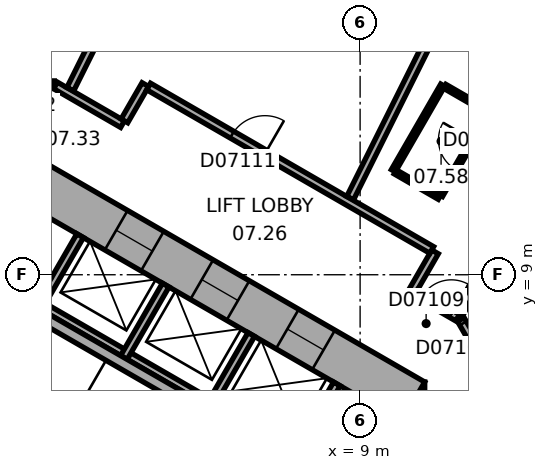
"""IFC4 building model, lengths in metres.
Left out: names, types, materials, properties, quantities, classifications, styles, units other than length and angle.
Written with IfcOpenShell. Run it as: python <this file> out.ifc"""

import sys

from ifc_helpers import new_model, si_unit, direction, frame, frame_2d, origin, place, context, subcontext, project, spatial, rectangle, extrude, element, fill, save


model = new_model("IFC4")
c1 = context("Model", 3, precision=1e-05, world=origin(), true_north=direction((0.0, 1.0)))
c2 = subcontext(c1, "Body", "Model", "MODEL_VIEW")
j1 = project(units=[si_unit("LENGTHUNIT", "METRE"), si_unit("PLANEANGLEUNIT", "RADIAN")], contexts=[c1])
p1 = place(None, origin())
s1 = spatial("IfcSite", under=j1, at=p1, CompositionType="ELEMENT")
p2 = place(p1, origin())
s2 = spatial("IfcBuilding", under=s1, at=p2, CompositionType="ELEMENT")
p3 = place(p2, frame((0.0, 0.0, 44.0)))
s3 = spatial("IfcBuildingStorey", under=s2, at=p3, CompositionType="ELEMENT", Elevation=44.0)
p4 = place(p3, frame((10.1, -6.177, 0.0), z_axis=(0.0, 0.0, 1.0), x_axis=(0.0, 1.0, 0.0)))
e1 = element("IfcWall", 1, at=p4, inside=s3, PredefinedType="SHEAR", context=c2, shape_type="SweptSolid", body=[
    extrude(rectangle(XDim=12.355, YDim=1.2, at=frame_2d((6.177, 0.0))), origin(), (0.0, 0.0, 1.0), 3.3),
])
p5 = place(p4, frame((6.378, 0.0, 0.0)))
e2 = element("IfcOpeningElement", 2, at=p5, cuts=e1, PredefinedType="OPENING", context=c2, shape_type="SweptSolid", body=[
    extrude(rectangle(XDim=1.5, YDim=2.1, at=frame_2d((0.75, 1.05))), frame((0.0, 0.61, 0.0), z_axis=(0.0, -1.0, 0.0), x_axis=(1.0, 0.0, 0.0)), (0.0, 0.0, 1.0), 1.22),
])
p6 = place(p4, frame((1.828, 0.0, 0.0)))
e3 = element("IfcOpeningElement", 3, at=p6, cuts=e1, PredefinedType="OPENING", context=c2, shape_type="SweptSolid", body=[
    extrude(rectangle(XDim=1.1, YDim=2.1, at=frame_2d((0.55, 1.05))), frame((0.0, 0.61, 0.0), z_axis=(0.0, -1.0, 0.0), x_axis=(1.0, 0.0, 0.0)), (0.0, 0.0, 1.0), 1.22),
])
p7 = place(p4, frame((4.427, 0.0, 0.0)))
e4 = element("IfcOpeningElement", 4, at=p7, cuts=e1, PredefinedType="OPENING", context=c2, shape_type="SweptSolid", body=[
    extrude(rectangle(XDim=1.1, YDim=2.1, at=frame_2d((0.55, 1.05))), frame((0.0, 0.61, 0.0), z_axis=(0.0, -1.0, 0.0), x_axis=(1.0, 0.0, 0.0)), (0.0, 0.0, 1.0), 1.22),
])
p8 = place(p3, frame((10.4, 5.658, 0.0), z_axis=(0.0, 0.0, 1.0), x_axis=(-0.866021384402, 0.500006961711, 0.0)))
e5 = element("IfcWall", 5, at=p8, inside=s3, PredefinedType="SHEAR", context=c2, shape_type="SweptSolid", body=[
    extrude(rectangle(XDim=12.355, YDim=1.2, at=frame_2d((6.178, 0.0))), origin(), (0.0, 0.0, 1.0), 3.3),
])
p9 = place(p8, frame((2.728, 0.0, 0.0)))
e6 = element("IfcOpeningElement", 6, at=p9, cuts=e5, PredefinedType="OPENING", context=c2, shape_type="SweptSolid", body=[
    extrude(rectangle(XDim=1.1, YDim=2.1, at=frame_2d((0.55, 1.05))), frame((0.0, 0.61, 0.0), z_axis=(0.0, -1.0, 0.0), x_axis=(1.0, 0.0, 0.0)), (0.0, 0.0, 1.0), 1.22),
])
p10 = place(p8, frame((5.328, 0.0, 0.0)))
e7 = element("IfcOpeningElement", 7, at=p10, cuts=e5, PredefinedType="OPENING", context=c2, shape_type="SweptSolid", body=[
    extrude(rectangle(XDim=1.1, YDim=2.1, at=frame_2d((0.55, 1.05))), frame((0.0, 0.61, 0.0), z_axis=(0.0, -1.0, 0.0), x_axis=(1.0, 0.0, 0.0)), (0.0, 0.0, 1.0), 1.22),
])
p11 = place(p8, frame((7.928, 0.0, 0.0)))
e8 = element("IfcOpeningElement", 8, at=p11, cuts=e5, PredefinedType="OPENING", context=c2, shape_type="SweptSolid", body=[
    extrude(rectangle(XDim=1.1, YDim=2.1, at=frame_2d((0.55, 1.05))), frame((0.0, 0.61, 0.0), z_axis=(0.0, -1.0, 0.0), x_axis=(1.0, 0.0, 0.0)), (0.0, 0.0, 1.0), 1.22),
])
p12 = place(p3, frame((7.424, 4.259, 0.0), z_axis=(0.0, 0.0, 1.0), x_axis=(-0.866026010844, 0.49999894854, 0.0)))
e9 = element("IfcWall", 9, at=p12, inside=s3, PredefinedType="PARTITIONING", context=c2, shape_type="SweptSolid", body=[
    extrude(rectangle(XDim=8.0, YDim=0.2, at=frame_2d((4.0, 0.0))), origin(), (0.0, 0.0, 1.0), 3.05),
])
for number, where, z_axis, x_axis in (
    (10, (7.287, 4.222, 0.0), (0.0, 0.0, 1.0), (0.5, 0.866, 0.0)),
    (11, (5.036, 5.522, 0.0), (0.0, 0.0, 1.0), (0.5, 0.866, 0.0)),
    (12, (2.784, 6.822, 0.0), (0.0, 0.0, 1.0), (0.5, 0.866, 0.0)),
    (13, (0.532, 8.122, 0.0), (0.0, 0.0, 1.0), (0.5, 0.866, 0.0)),
):
    element("IfcWall", number, at=place(p3, frame(where, z_axis=z_axis, x_axis=x_axis)), inside=s3, PredefinedType="PARTITIONING", context=c2, shape_type="SweptSolid", body=[
        extrude(rectangle(XDim=2.2, YDim=0.2, at=frame_2d((1.1, 0.0))), origin(), (0.0, 0.0, 1.0), 3.05),
    ])
p13 = place(p3, frame((6.303, 4.617, 0.0), z_axis=(0.0, 0.0, 1.0), x_axis=(-0.866027801685, 0.499995846692, 0.0)))
e14 = element("IfcWall", 14, at=p13, inside=s3, PredefinedType="SHEAR", context=c2, shape_type="SweptSolid", body=[
    extrude(rectangle(XDim=7.06, YDim=0.3, at=frame_2d((3.53, 0.0))), origin(), (0.0, 0.0, 1.0), 3.05),
])
p14 = place(p3, frame((0.95, 14.001, 0.0), z_axis=(0.0, 0.0, 1.0), x_axis=(-1.0, 0.0, 0.0)))
e15 = element("IfcWall", 15, at=p14, inside=s3, PredefinedType="PARTITIONING", context=c2, shape_type="SweptSolid", body=[
    extrude(rectangle(XDim=1.86, YDim=0.2, at=frame_2d((0.93, 0.0))), origin(), (0.0, 0.0, 1.0), 3.05),
])
p15 = place(p14, frame((0.48, 0.0, 0.0)))
e16 = element("IfcOpeningElement", 16, at=p15, cuts=e15, PredefinedType="OPENING", context=c2, shape_type="SweptSolid", body=[
    extrude(rectangle(XDim=0.9, YDim=2.1, at=frame_2d((0.45, 1.05))), frame((0.0, 0.11, 0.0), z_axis=(0.0, -1.0, 0.0), x_axis=(1.0, 0.0, 0.0)), (0.0, 0.0, 1.0), 0.22),
])
p16 = place(p3, frame((2.748, 12.962, 0.0), z_axis=(0.0, 0.0, 1.0), x_axis=(-0.866013897511, 0.50001992892, 0.0)))
e17 = element("IfcWall", 17, at=p16, inside=s3, PredefinedType="PARTITIONING", context=c2, shape_type="SweptSolid", body=[
    extrude(rectangle(XDim=2.037, YDim=0.2, at=frame_2d((1.018, 0.0))), origin(), (0.0, 0.0, 1.0), 3.05),
])
p17 = place(p3, frame((3.349, 14.002, 0.0), z_axis=(0.0, 0.0, 1.0), x_axis=(-0.500074377092, -0.865982457891, 0.0)))
e18 = element("IfcWall", 18, at=p17, inside=s3, PredefinedType="PARTITIONING", context=c2, shape_type="SweptSolid", body=[
    extrude(rectangle(XDim=1.101, YDim=0.2, at=frame_2d((0.55, 0.0))), origin(), (0.0, 0.0, 1.0), 3.05),
])
p18 = place(p3, frame((5.351, 21.859, 0.0), z_axis=(0.0, 0.0, 1.0), x_axis=(-0.446205309328, -0.894930624086, 0.0)))
e19 = element("IfcWall", 19, at=p18, inside=s3, PredefinedType="PARTITIONING", context=c2, shape_type="SweptSolid", body=[
    extrude(rectangle(XDim=8.913, YDim=0.2, at=frame_2d((4.457, 0.0))), origin(), (0.0, 0.0, 1.0), 2.6),
])
p19 = place(p3, frame((9.875, 11.736, 0.0), z_axis=(0.0, 0.0, 1.0), x_axis=(0.499936506574, 0.866062058628, 0.0)))
e20 = element("IfcWall", 20, at=p19, inside=s3, PredefinedType="PARTITIONING", context=c2, shape_type="SweptSolid", body=[
    extrude(rectangle(XDim=2.6, YDim=0.12, at=frame_2d((1.3, 0.0))), origin(), (0.0, 0.0, 1.0), 3.05),
])
p20 = place(p3, frame((10.371, 8.561, 0.0), z_axis=(0.0, 0.0, 1.0), x_axis=(0.499986357472, 0.866033280158, 0.0)))
e21 = element("IfcWall", 21, at=p20, inside=s3, PredefinedType="PARTITIONING", context=c2, shape_type="SweptSolid", body=[
    extrude(rectangle(XDim=1.201, YDim=0.2, at=frame_2d((0.601, 0.0))), origin(), (0.0, 0.0, 1.0), 3.05),
])
p21 = place(p3, frame((10.885, 9.652, 0.0), z_axis=(0.0, 0.0, 1.0), x_axis=(-0.866033868542, 0.499985338323, 0.0)))
e22 = element("IfcWall", 22, at=p21, inside=s3, PredefinedType="PARTITIONING", context=c2, shape_type="SweptSolid", body=[
    extrude(rectangle(XDim=8.602, YDim=0.2, at=frame_2d((4.301, 0.0))), origin(), (0.0, 0.0, 1.0), 3.05),
])
p22 = place(p21, frame((5.069, 0.0, 0.0)))
e23 = element("IfcOpeningElement", 23, at=p22, cuts=e22, PredefinedType="OPENING", context=c2, shape_type="SweptSolid", body=[
    extrude(rectangle(XDim=1.0, YDim=2.1, at=frame_2d((0.5, 1.05))), frame((0.0, 0.11, 0.0), z_axis=(0.0, -1.0, 0.0), x_axis=(1.0, 0.0, 0.0)), (0.0, 0.0, 1.0), 0.22),
])
for number, where, z_axis, x_axis in (
    (24, (11.087, 11.036, 0.0), (0.0, 0.0, 1.0), (-0.866, 0.5, 0.0)),
    (25, (11.226, 13.958, 0.0), (0.0, 0.0, 1.0), (0.866, -0.5, 0.0)),
):
    element("IfcWall", number, at=place(p3, frame(where, z_axis=z_axis, x_axis=x_axis)), inside=s3, PredefinedType="PARTITIONING", context=c2, shape_type="SweptSolid", body=[
        extrude(rectangle(XDim=1.34, YDim=0.12, at=frame_2d((0.67, 0.0))), origin(), (0.0, 0.0, 1.0), 3.05),
    ])
p23 = place(p3, frame((11.566, 7.871, 0.0), z_axis=(0.0, 0.0, 1.0), x_axis=(-0.866004557827, 0.500036104519, 0.0)))
e26 = element("IfcWall", 26, at=p23, inside=s3, PredefinedType="PARTITIONING", context=c2, shape_type="SweptSolid", body=[
    extrude(rectangle(XDim=1.28, YDim=0.2, at=frame_2d((0.64, 0.0))), origin(), (0.0, 0.0, 1.0), 3.05),
])
p24 = place(p23, frame((0.19, 0.0, 0.0)))
e27 = element("IfcOpeningElement", 27, at=p24, cuts=e26, PredefinedType="OPENING", context=c2, shape_type="SweptSolid", body=[
    extrude(rectangle(XDim=0.9, YDim=2.1, at=frame_2d((0.45, 1.05))), frame((0.0, 0.11, 0.0), z_axis=(0.0, -1.0, 0.0), x_axis=(1.0, 0.0, 0.0)), (0.0, 0.0, 1.0), 0.22),
])
p25 = place(p3, frame((12.357, 13.236, 0.0), z_axis=(0.0, 0.0, 1.0), x_axis=(-0.50000366821, -0.866023285932, 0.0)))
e28 = element("IfcWall", 28, at=p25, inside=s3, PredefinedType="PARTITIONING", context=c2, shape_type="SweptSolid", body=[
    extrude(rectangle(XDim=2.48, YDim=0.12, at=frame_2d((1.24, 0.0))), origin(), (0.0, 0.0, 1.0), 3.05),
])
p26 = place(p25, frame((0.79, 0.0, 0.0)))
e29 = element("IfcOpeningElement", 29, at=p26, cuts=e28, PredefinedType="OPENING", context=c2, shape_type="SweptSolid", body=[
    extrude(rectangle(XDim=0.9, YDim=2.1, at=frame_2d((0.45, 1.05))), frame((0.0, 0.07, 0.0), z_axis=(0.0, -1.0, 0.0), x_axis=(1.0, 0.0, 0.0)), (0.0, 0.0, 1.0), 0.14),
])
p27 = place(p3, frame((12.393, 18.348, 0.0), z_axis=(0.0, 0.0, 1.0), x_axis=(-0.446176022699, -0.894945225569, 0.0)))
e30 = element("IfcWall", 30, at=p27, inside=s3, PredefinedType="PARTITIONING", context=c2, shape_type="SweptSolid", body=[
    extrude(rectangle(XDim=8.191, YDim=0.2, at=frame_2d((4.095, 0.0))), origin(), (0.0, 0.0, 1.0), 2.6),
])
p28 = place(p3, frame((12.58, 6.212, 0.0), z_axis=(0.0, 0.0, 1.0), x_axis=(-0.500063286585, 0.865988862174, 0.0)))
e31 = element("IfcWall", 31, at=p28, inside=s3, PredefinedType="PARTITIONING", context=c2, shape_type="SweptSolid", body=[
    extrude(rectangle(XDim=1.86, YDim=0.2, at=frame_2d((0.93, 0.0))), origin(), (0.0, 0.0, 1.0), 3.05),
])
p29 = place(p28, frame((0.842, 0.0, 0.0)))
e32 = element("IfcOpeningElement", 32, at=p29, cuts=e31, PredefinedType="OPENING", context=c2, shape_type="SweptSolid", body=[
    extrude(rectangle(XDim=0.9, YDim=2.1, at=frame_2d((0.45, 1.05))), frame((0.0, 0.11, 0.0), z_axis=(0.0, -1.0, 0.0), x_axis=(1.0, 0.0, 0.0)), (0.0, 0.0, 1.0), 0.22),
])
p30 = place(p3, frame((15.915, 16.592, 0.0), z_axis=(0.0, 0.0, 1.0), x_axis=(-0.446199736347, -0.894933402709, 0.0)))
e33 = element("IfcWall", 33, at=p30, inside=s3, PredefinedType="PARTITIONING", context=c2, shape_type="SweptSolid", body=[
    extrude(rectangle(XDim=9.635, YDim=0.2, at=frame_2d((4.817, 0.0))), origin(), (0.0, 0.0, 1.0), 3.05),
])
p31 = place(p9, origin())
e34 = element("IfcDoor", 34, at=p31, inside=s3, OperationType="DOUBLE_DOOR_SLIDING", PredefinedType="DOOR", context=c2, shape_type="SweptSolid", body=[
    extrude(rectangle(XDim=1.1, YDim=2.1, at=frame_2d((0.55, 1.05))), frame((0.0, 0.025, 0.0), z_axis=(0.0, -1.0, 0.0), x_axis=(1.0, 0.0, 0.0)), (0.0, 0.0, 1.0), 0.05),
])
fill(e6, e34)
p32 = place(p10, origin())
e35 = element("IfcDoor", 35, at=p32, inside=s3, OperationType="DOUBLE_DOOR_SLIDING", PredefinedType="DOOR", context=c2, shape_type="SweptSolid", body=[
    extrude(rectangle(XDim=1.1, YDim=2.1, at=frame_2d((0.55, 1.05))), frame((0.0, 0.025, 0.0), z_axis=(0.0, -1.0, 0.0), x_axis=(1.0, 0.0, 0.0)), (0.0, 0.0, 1.0), 0.05),
])
fill(e7, e35)
p33 = place(p11, origin())
e36 = element("IfcDoor", 36, at=p33, inside=s3, OperationType="DOUBLE_DOOR_SLIDING", PredefinedType="DOOR", context=c2, shape_type="SweptSolid", body=[
    extrude(rectangle(XDim=1.1, YDim=2.1, at=frame_2d((0.55, 1.05))), frame((0.0, 0.025, 0.0), z_axis=(0.0, -1.0, 0.0), x_axis=(1.0, 0.0, 0.0)), (0.0, 0.0, 1.0), 0.05),
])
fill(e8, e36)
p34 = place(p29, origin())
e37 = element("IfcDoor", 37, at=p34, inside=s3, OperationType="SINGLE_SWING_LEFT", PredefinedType="DOOR", context=c2, shape_type="SweptSolid", body=[
    extrude(rectangle(XDim=0.9, YDim=2.1, at=frame_2d((0.45, 1.05))), frame((0.0, 0.025, 0.0), z_axis=(0.0, -1.0, 0.0), x_axis=(1.0, 0.0, 0.0)), (0.0, 0.0, 1.0), 0.05),
])
fill(e32, e37)
p35 = place(p24, origin())
e38 = element("IfcDoor", 38, at=p35, inside=s3, OperationType="SINGLE_SWING_LEFT", PredefinedType="DOOR", context=c2, shape_type="SweptSolid", body=[
    extrude(rectangle(XDim=0.9, YDim=2.1, at=frame_2d((0.45, 1.05))), frame((0.0, 0.025, 0.0), z_axis=(0.0, -1.0, 0.0), x_axis=(1.0, 0.0, 0.0)), (0.0, 0.0, 1.0), 0.05),
])
fill(e27, e38)
p36 = place(p26, origin())
e39 = element("IfcDoor", 39, at=p36, inside=s3, OperationType="SINGLE_SWING_LEFT", PredefinedType="DOOR", context=c2, shape_type="SweptSolid", body=[
    extrude(rectangle(XDim=0.9, YDim=2.1, at=frame_2d((0.45, 1.05))), frame((0.0, 0.025, 0.0), z_axis=(0.0, -1.0, 0.0), x_axis=(1.0, 0.0, 0.0)), (0.0, 0.0, 1.0), 0.05),
])
fill(e29, e39)
p37 = place(p22, origin())
e40 = element("IfcDoor", 40, at=p37, inside=s3, OperationType="SINGLE_SWING_LEFT", PredefinedType="DOOR", context=c2, shape_type="SweptSolid", body=[
    extrude(rectangle(XDim=1.0, YDim=2.1, at=frame_2d((0.5, 1.05))), frame((0.0, 0.025, 0.0), z_axis=(0.0, -1.0, 0.0), x_axis=(1.0, 0.0, 0.0)), (0.0, 0.0, 1.0), 0.05),
])
fill(e23, e40)
save(model, sys.argv[1])
